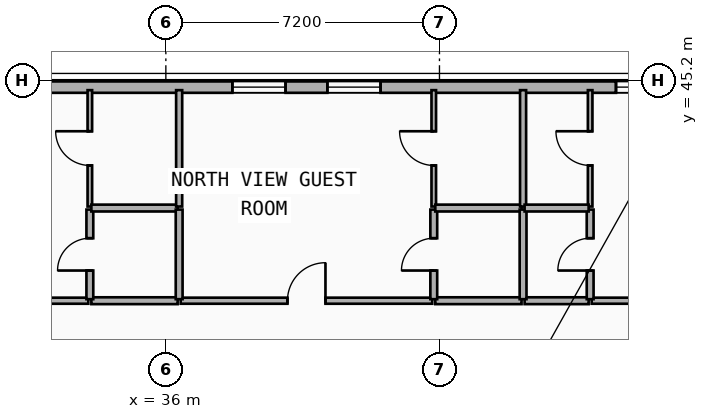
"""IFC4 building model, lengths in metres.
Left out: names, types, materials, properties, quantities, classifications, styles, units other than length and angle.
Written with IfcOpenShell. Run it as: python <this file> out.ifc"""

import sys

from ifc_helpers import new_model, si_unit, direction, frame, frame_2d, origin, place, context, subcontext, project, spatial, rectangle, extrude, element, fill, save


model = new_model("IFC4")
c1 = context("Model", 3, precision=1e-05, world=origin(), true_north=direction((0.0, 1.0)))
c2 = subcontext(c1, "Body", "Model", "MODEL_VIEW")
j1 = project(units=[si_unit("LENGTHUNIT", "METRE"), si_unit("PLANEANGLEUNIT", "RADIAN")], contexts=[c1])
p1 = place(None, origin())
s1 = spatial("IfcSite", under=j1, at=p1, CompositionType="ELEMENT")
p2 = place(p1, origin())
s2 = spatial("IfcBuilding", under=s1, at=p2, CompositionType="ELEMENT")
p3 = place(p2, frame((0.0, 0.0, 46.5)))
s3 = spatial("IfcBuildingStorey", under=s2, at=p3, CompositionType="ELEMENT", Elevation=46.5)
p4 = place(p3, frame((4.2, 45.02, 0.0), z_axis=(0.0, 0.0, 1.0), x_axis=(1.0, 0.0, 0.0)))
e1 = element("IfcWall", 1, at=p4, inside=s3, PredefinedType="SOLIDWALL", context=c2, shape_type="SweptSolid", body=[
    extrude(rectangle(XDim=49.2, YDim=0.3, at=frame_2d((24.6, 0.0))), origin(), (0.0, 0.0, 1.0), 3.24),
])
p5 = place(p4, frame((7.99, 0.0, 0.85)))
e2 = element("IfcOpeningElement", 2, at=p5, cuts=e1, PredefinedType="OPENING", context=c2, shape_type="SweptSolid", body=[
    extrude(rectangle(XDim=1.4, YDim=1.8, at=frame_2d((0.7, 0.9))), frame((0.0, 0.16, 0.0), z_axis=(0.0, -1.0, 0.0), x_axis=(1.0, 0.0, 0.0)), (0.0, 0.0, 1.0), 0.32),
])
p6 = place(p4, frame((11.22, 0.0, 0.85)))
e3 = element("IfcOpeningElement", 3, at=p6, cuts=e1, PredefinedType="OPENING", context=c2, shape_type="SweptSolid", body=[
    extrude(rectangle(XDim=1.4, YDim=1.8, at=frame_2d((0.7, 0.9))), frame((0.0, 0.16, 0.0), z_axis=(0.0, -1.0, 0.0), x_axis=(1.0, 0.0, 0.0)), (0.0, 0.0, 1.0), 0.32),
])
p7 = place(p4, frame((17.78, 0.0, 0.85)))
e4 = element("IfcOpeningElement", 4, at=p7, cuts=e1, PredefinedType="OPENING", context=c2, shape_type="SweptSolid", body=[
    extrude(rectangle(XDim=1.4, YDim=1.8, at=frame_2d((0.7, 0.9))), frame((0.0, 0.16, 0.0), z_axis=(0.0, -1.0, 0.0), x_axis=(1.0, 0.0, 0.0)), (0.0, 0.0, 1.0), 0.32),
])
p8 = place(p4, frame((19.559, 0.0, 0.85)))
e5 = element("IfcOpeningElement", 5, at=p8, cuts=e1, PredefinedType="OPENING", context=c2, shape_type="SweptSolid", body=[
    extrude(rectangle(XDim=1.4, YDim=1.8, at=frame_2d((0.7, 0.9))), frame((0.0, 0.16, 0.0), z_axis=(0.0, -1.0, 0.0), x_axis=(1.0, 0.0, 0.0)), (0.0, 0.0, 1.0), 0.32),
])
p9 = place(p4, frame((24.703, 0.0, 0.85)))
e6 = element("IfcOpeningElement", 6, at=p9, cuts=e1, PredefinedType="OPENING", context=c2, shape_type="SweptSolid", body=[
    extrude(rectangle(XDim=1.4, YDim=1.8, at=frame_2d((0.7, 0.9))), frame((0.0, 0.16, 0.0), z_axis=(0.0, -1.0, 0.0), x_axis=(1.0, 0.0, 0.0)), (0.0, 0.0, 1.0), 0.32),
])
p10 = place(p4, frame((27.101, 0.0, 0.85)))
e7 = element("IfcOpeningElement", 7, at=p10, cuts=e1, PredefinedType="OPENING", context=c2, shape_type="SweptSolid", body=[
    extrude(rectangle(XDim=1.4, YDim=1.8, at=frame_2d((0.7, 0.9))), frame((0.0, 0.16, 0.0), z_axis=(0.0, -1.0, 0.0), x_axis=(1.0, 0.0, 0.0)), (0.0, 0.0, 1.0), 0.32),
])
p11 = place(p4, frame((33.55, 0.0, 0.85)))
e8 = element("IfcOpeningElement", 8, at=p11, cuts=e1, PredefinedType="OPENING", context=c2, shape_type="SweptSolid", body=[
    extrude(rectangle(XDim=1.4, YDim=1.8, at=frame_2d((0.7, 0.9))), frame((0.0, 0.16, 0.0), z_axis=(0.0, -1.0, 0.0), x_axis=(1.0, 0.0, 0.0)), (0.0, 0.0, 1.0), 0.32),
])
p12 = place(p4, frame((36.05, 0.0, 0.85)))
e9 = element("IfcOpeningElement", 9, at=p12, cuts=e1, PredefinedType="OPENING", context=c2, shape_type="SweptSolid", body=[
    extrude(rectangle(XDim=1.4, YDim=1.8, at=frame_2d((0.7, 0.9))), frame((0.0, 0.16, 0.0), z_axis=(0.0, -1.0, 0.0), x_axis=(1.0, 0.0, 0.0)), (0.0, 0.0, 1.0), 0.32),
])
p13 = place(p4, frame((43.645, 0.0, 0.85)))
e10 = element("IfcOpeningElement", 10, at=p13, cuts=e1, PredefinedType="OPENING", context=c2, shape_type="SweptSolid", body=[
    extrude(rectangle(XDim=1.4, YDim=1.8, at=frame_2d((0.7, 0.9))), frame((0.0, 0.16, 0.0), z_axis=(0.0, -1.0, 0.0), x_axis=(1.0, 0.0, 0.0)), (0.0, 0.0, 1.0), 0.32),
])
p14 = place(p4, frame((45.424, 0.0, 0.85)))
e11 = element("IfcOpeningElement", 11, at=p14, cuts=e1, PredefinedType="OPENING", context=c2, shape_type="SweptSolid", body=[
    extrude(rectangle(XDim=1.4, YDim=1.8, at=frame_2d((0.7, 0.9))), frame((0.0, 0.16, 0.0), z_axis=(0.0, -1.0, 0.0), x_axis=(1.0, 0.0, 0.0)), (0.0, 0.0, 1.0), 0.32),
])
p15 = place(p3, frame((27.644, 39.4, 0.0), z_axis=(0.0, 0.0, 1.0), x_axis=(1.0, 0.0, 0.0)))
e12 = element("IfcWall", 12, at=p15, inside=s3, PredefinedType="PARTITIONING", context=c2, shape_type="SweptSolid", body=[
    extrude(rectangle(XDim=6.316, YDim=0.16, at=frame_2d((3.158, 0.0))), origin(), (0.0, 0.0, 1.0), 3.24),
])
p16 = place(p15, frame((2.658, 0.0, 0.0)))
e13 = element("IfcOpeningElement", 13, at=p16, cuts=e12, PredefinedType="OPENING", context=c2, shape_type="SweptSolid", body=[
    extrude(rectangle(XDim=1.0, YDim=2.15, at=frame_2d((0.5, 1.075))), frame((0.0, 0.09, 0.0), z_axis=(0.0, -1.0, 0.0), x_axis=(1.0, 0.0, 0.0)), (0.0, 0.0, 1.0), 0.18),
])
p17 = place(p3, frame((34.04, 39.4, 0.0), z_axis=(0.0, 0.0, 1.0), x_axis=(1.0, 0.0, 0.0)))
e14 = element("IfcWall", 14, at=p17, inside=s3, PredefinedType="PLUMBINGWALL", context=c2, shape_type="SweptSolid", body=[
    extrude(rectangle(XDim=2.27, YDim=0.18, at=frame_2d((1.135, 0.0))), origin(), (0.0, 0.0, 1.0), 3.24),
])
p18 = place(p3, frame((36.39, 39.4, 0.0), z_axis=(0.0, 0.0, 1.0), x_axis=(1.0, 0.0, 0.0)))
e15 = element("IfcWall", 15, at=p18, inside=s3, PredefinedType="PARTITIONING", context=c2, shape_type="SweptSolid", body=[
    extrude(rectangle(XDim=6.62, YDim=0.16, at=frame_2d((3.31, 0.0))), origin(), (0.0, 0.0, 1.0), 3.24),
])
p19 = place(p18, frame((2.81, 0.0, 0.0)))
e16 = element("IfcOpeningElement", 16, at=p19, cuts=e15, PredefinedType="OPENING", context=c2, shape_type="SweptSolid", body=[
    extrude(rectangle(XDim=1.0, YDim=2.15, at=frame_2d((0.5, 1.075))), frame((0.0, 0.09, 0.0), z_axis=(0.0, -1.0, 0.0), x_axis=(1.0, 0.0, 0.0)), (0.0, 0.0, 1.0), 0.18),
])
p20 = place(p3, frame((43.09, 39.4, 0.0), z_axis=(0.0, 0.0, 1.0), x_axis=(1.0, 0.0, 0.0)))
e17 = element("IfcWall", 17, at=p20, inside=s3, PredefinedType="PLUMBINGWALL", context=c2, shape_type="SweptSolid", body=[
    extrude(rectangle(XDim=2.27, YDim=0.18, at=frame_2d((1.135, 0.0))), origin(), (0.0, 0.0, 1.0), 3.24),
])
p21 = place(p3, frame((47.205, 39.4, 0.0), z_axis=(0.0, 0.0, 1.0), x_axis=(1.0, 0.0, 0.0)))
e18 = element("IfcWall", 18, at=p21, inside=s3, PredefinedType="PARTITIONING", context=c2, shape_type="SweptSolid", body=[
    extrude(rectangle(XDim=4.459, YDim=0.16, at=frame_2d((2.229, 0.0))), origin(), (0.0, 0.0, 1.0), 3.24),
])
p22 = place(p21, frame((1.729, 0.0, 0.0)))
e19 = element("IfcOpeningElement", 19, at=p22, cuts=e18, PredefinedType="OPENING", context=c2, shape_type="SweptSolid", body=[
    extrude(rectangle(XDim=1.0, YDim=2.15, at=frame_2d((0.5, 1.075))), frame((0.0, 0.09, 0.0), z_axis=(0.0, -1.0, 0.0), x_axis=(1.0, 0.0, 0.0)), (0.0, 0.0, 1.0), 0.18),
])
p23 = place(p3, frame((45.44, 39.4, 0.0), z_axis=(0.0, 0.0, 1.0), x_axis=(1.0, 0.0, 0.0)))
e20 = element("IfcWall", 20, at=p23, inside=s3, PredefinedType="PLUMBINGWALL", context=c2, shape_type="SweptSolid", body=[
    extrude(rectangle(XDim=1.685, YDim=0.18, at=frame_2d((0.843, 0.0))), origin(), (0.0, 0.0, 1.0), 3.24),
])
p24 = place(p3, frame((34.0, 39.44, 0.0), z_axis=(0.0, 0.0, 1.0), x_axis=(0.0, 1.0, 0.0)))
e21 = element("IfcWall", 21, at=p24, inside=s3, PredefinedType="PLUMBINGWALL", context=c2, shape_type="SweptSolid", body=[
    extrude(rectangle(XDim=2.358, YDim=0.18, at=frame_2d((1.179, 0.0))), origin(), (0.0, 0.0, 1.0), 3.24),
])
p25 = place(p24, frame((0.754, 0.0, 0.0)))
e22 = element("IfcOpeningElement", 22, at=p25, cuts=e21, PredefinedType="OPENING", context=c2, shape_type="SweptSolid", body=[
    extrude(rectangle(XDim=0.85, YDim=2.1, at=frame_2d((0.425, 1.05))), frame((0.0, 0.1, 0.0), z_axis=(0.0, -1.0, 0.0), x_axis=(1.0, 0.0, 0.0)), (0.0, 0.0, 1.0), 0.2),
])
p26 = place(p3, frame((34.0, 41.878, 0.0), z_axis=(0.0, 0.0, 1.0), x_axis=(0.0, 1.0, 0.0)))
e23 = element("IfcWall", 23, at=p26, inside=s3, PredefinedType="PARTITIONING", context=c2, shape_type="SweptSolid", body=[
    extrude(rectangle(XDim=3.062, YDim=0.12, at=frame_2d((1.531, 0.0))), origin(), (0.0, 0.0, 1.0), 3.24),
])
p27 = place(p26, frame((1.081, 0.0, 0.0)))
e24 = element("IfcOpeningElement", 24, at=p27, cuts=e23, PredefinedType="OPENING", context=c2, shape_type="SweptSolid", body=[
    extrude(rectangle(XDim=0.9, YDim=2.1, at=frame_2d((0.45, 1.05))), frame((0.0, 0.07, 0.0), z_axis=(0.0, -1.0, 0.0), x_axis=(1.0, 0.0, 0.0)), (0.0, 0.0, 1.0), 0.14),
])
p28 = place(p3, frame((34.04, 41.838, 0.0), z_axis=(0.0, 0.0, 1.0), x_axis=(1.0, 0.0, 0.0)))
e25 = element("IfcWall", 25, at=p28, inside=s3, PredefinedType="PLUMBINGWALL", context=c2, shape_type="SweptSolid", body=[
    extrude(rectangle(XDim=2.27, YDim=0.18, at=frame_2d((1.135, 0.0))), origin(), (0.0, 0.0, 1.0), 3.24),
])
p29 = place(p3, frame((36.35, 39.44, 0.0), z_axis=(0.0, 0.0, 1.0), x_axis=(0.0, 1.0, 0.0)))
e26 = element("IfcWall", 26, at=p29, inside=s3, PredefinedType="PLUMBINGWALL", context=c2, shape_type="SweptSolid", body=[
    extrude(rectangle(XDim=2.358, YDim=0.18, at=frame_2d((1.179, 0.0))), origin(), (0.0, 0.0, 1.0), 3.24),
])
p30 = place(p3, frame((36.35, 41.878, 0.0), z_axis=(0.0, 0.0, 1.0), x_axis=(0.0, 1.0, 0.0)))
e27 = element("IfcWall", 27, at=p30, inside=s3, PredefinedType="PARTITIONING", context=c2, shape_type="SweptSolid", body=[
    extrude(rectangle(XDim=3.062, YDim=0.16, at=frame_2d((1.531, 0.0))), origin(), (0.0, 0.0, 1.0), 3.24),
])
p31 = place(p3, frame((43.05, 39.44, 0.0), z_axis=(0.0, 0.0, 1.0), x_axis=(0.0, 1.0, 0.0)))
e28 = element("IfcWall", 28, at=p31, inside=s3, PredefinedType="PLUMBINGWALL", context=c2, shape_type="SweptSolid", body=[
    extrude(rectangle(XDim=2.358, YDim=0.18, at=frame_2d((1.179, 0.0))), origin(), (0.0, 0.0, 1.0), 3.24),
])
p32 = place(p31, frame((0.754, 0.0, 0.0)))
e29 = element("IfcOpeningElement", 29, at=p32, cuts=e28, PredefinedType="OPENING", context=c2, shape_type="SweptSolid", body=[
    extrude(rectangle(XDim=0.85, YDim=2.1, at=frame_2d((0.425, 1.05))), frame((0.0, 0.1, 0.0), z_axis=(0.0, -1.0, 0.0), x_axis=(1.0, 0.0, 0.0)), (0.0, 0.0, 1.0), 0.2),
])
p33 = place(p3, frame((43.05, 41.878, 0.0), z_axis=(0.0, 0.0, 1.0), x_axis=(0.0, 1.0, 0.0)))
e30 = element("IfcWall", 30, at=p33, inside=s3, PredefinedType="PARTITIONING", context=c2, shape_type="SweptSolid", body=[
    extrude(rectangle(XDim=3.062, YDim=0.12, at=frame_2d((1.531, 0.0))), origin(), (0.0, 0.0, 1.0), 3.24),
])
p34 = place(p33, frame((1.081, 0.0, 0.0)))
e31 = element("IfcOpeningElement", 31, at=p34, cuts=e30, PredefinedType="OPENING", context=c2, shape_type="SweptSolid", body=[
    extrude(rectangle(XDim=0.9, YDim=2.1, at=frame_2d((0.45, 1.05))), frame((0.0, 0.07, 0.0), z_axis=(0.0, -1.0, 0.0), x_axis=(1.0, 0.0, 0.0)), (0.0, 0.0, 1.0), 0.14),
])
p35 = place(p3, frame((43.09, 41.838, 0.0), z_axis=(0.0, 0.0, 1.0), x_axis=(1.0, 0.0, 0.0)))
e32 = element("IfcWall", 32, at=p35, inside=s3, PredefinedType="PLUMBINGWALL", context=c2, shape_type="SweptSolid", body=[
    extrude(rectangle(XDim=2.27, YDim=0.18, at=frame_2d((1.135, 0.0))), origin(), (0.0, 0.0, 1.0), 3.24),
])
p36 = place(p3, frame((45.4, 39.44, 0.0), z_axis=(0.0, 0.0, 1.0), x_axis=(0.0, 1.0, 0.0)))
e33 = element("IfcWall", 33, at=p36, inside=s3, PredefinedType="PLUMBINGWALL", context=c2, shape_type="SweptSolid", body=[
    extrude(rectangle(XDim=2.358, YDim=0.18, at=frame_2d((1.179, 0.0))), origin(), (0.0, 0.0, 1.0), 3.24),
])
p37 = place(p3, frame((45.4, 41.878, 0.0), z_axis=(0.0, 0.0, 1.0), x_axis=(0.0, 1.0, 0.0)))
e34 = element("IfcWall", 34, at=p37, inside=s3, PredefinedType="PARTITIONING", context=c2, shape_type="SweptSolid", body=[
    extrude(rectangle(XDim=3.062, YDim=0.16, at=frame_2d((1.531, 0.0))), origin(), (0.0, 0.0, 1.0), 3.24),
])
p38 = place(p3, frame((47.165, 39.44, 0.0), z_axis=(0.0, 0.0, 1.0), x_axis=(0.0, 1.0, 0.0)))
e35 = element("IfcWall", 35, at=p38, inside=s3, PredefinedType="PLUMBINGWALL", context=c2, shape_type="SweptSolid", body=[
    extrude(rectangle(XDim=2.358, YDim=0.18, at=frame_2d((1.179, 0.0))), origin(), (0.0, 0.0, 1.0), 3.24),
])
p39 = place(p38, frame((0.754, 0.0, 0.0)))
e36 = element("IfcOpeningElement", 36, at=p39, cuts=e35, PredefinedType="OPENING", context=c2, shape_type="SweptSolid", body=[
    extrude(rectangle(XDim=0.85, YDim=2.1, at=frame_2d((0.425, 1.05))), frame((0.0, 0.1, 0.0), z_axis=(0.0, -1.0, 0.0), x_axis=(1.0, 0.0, 0.0)), (0.0, 0.0, 1.0), 0.2),
])
p40 = place(p3, frame((47.165, 41.878, 0.0), z_axis=(0.0, 0.0, 1.0), x_axis=(0.0, 1.0, 0.0)))
e37 = element("IfcWall", 37, at=p40, inside=s3, PredefinedType="PARTITIONING", context=c2, shape_type="SweptSolid", body=[
    extrude(rectangle(XDim=3.062, YDim=0.12, at=frame_2d((1.531, 0.0))), origin(), (0.0, 0.0, 1.0), 3.24),
])
p41 = place(p40, frame((1.081, 0.0, 0.0)))
e38 = element("IfcOpeningElement", 38, at=p41, cuts=e37, PredefinedType="OPENING", context=c2, shape_type="SweptSolid", body=[
    extrude(rectangle(XDim=0.9, YDim=2.1, at=frame_2d((0.45, 1.05))), frame((0.0, 0.07, 0.0), z_axis=(0.0, -1.0, 0.0), x_axis=(1.0, 0.0, 0.0)), (0.0, 0.0, 1.0), 0.14),
])
p42 = place(p3, frame((45.44, 41.838, 0.0), z_axis=(0.0, 0.0, 1.0), x_axis=(1.0, 0.0, 0.0)))
e39 = element("IfcWall", 39, at=p42, inside=s3, PredefinedType="PLUMBINGWALL", context=c2, shape_type="SweptSolid", body=[
    extrude(rectangle(XDim=1.685, YDim=0.18, at=frame_2d((0.843, 0.0))), origin(), (0.0, 0.0, 1.0), 3.24),
])
p43 = place(p11, origin())
e40 = element("IfcWindow", 40, at=p43, inside=s3, PartitioningType="SINGLE_PANEL", PredefinedType="WINDOW", context=c2, shape_type="SweptSolid", body=[
    extrude(rectangle(XDim=1.4, YDim=1.8, at=frame_2d((0.7, 0.9))), frame((0.0, 0.03, 0.0), z_axis=(0.0, -1.0, 0.0), x_axis=(1.0, 0.0, 0.0)), (0.0, 0.0, 1.0), 0.06),
])
fill(e8, e40)
p44 = place(p12, origin())
e41 = element("IfcWindow", 41, at=p44, inside=s3, PartitioningType="SINGLE_PANEL", PredefinedType="WINDOW", context=c2, shape_type="SweptSolid", body=[
    extrude(rectangle(XDim=1.4, YDim=1.8, at=frame_2d((0.7, 0.9))), frame((0.0, 0.03, 0.0), z_axis=(0.0, -1.0, 0.0), x_axis=(1.0, 0.0, 0.0)), (0.0, 0.0, 1.0), 0.06),
])
fill(e9, e41)
p45 = place(p13, origin())
e42 = element("IfcWindow", 42, at=p45, inside=s3, PartitioningType="SINGLE_PANEL", PredefinedType="WINDOW", context=c2, shape_type="SweptSolid", body=[
    extrude(rectangle(XDim=1.4, YDim=1.8, at=frame_2d((0.7, 0.9))), frame((0.0, 0.03, 0.0), z_axis=(0.0, -1.0, 0.0), x_axis=(1.0, 0.0, 0.0)), (0.0, 0.0, 1.0), 0.06),
])
fill(e10, e42)
p46 = place(p19, origin())
e43 = element("IfcDoor", 43, at=p46, inside=s3, OperationType="SINGLE_SWING_RIGHT", PredefinedType="DOOR", context=c2, shape_type="SweptSolid", body=[
    extrude(rectangle(XDim=1.0, YDim=2.15, at=frame_2d((0.5, 1.075))), frame((0.0, 0.025, 0.0), z_axis=(0.0, -1.0, 0.0), x_axis=(1.0, 0.0, 0.0)), (0.0, 0.0, 1.0), 0.05),
])
fill(e16, e43)
p47 = place(p25, origin())
e44 = element("IfcDoor", 44, at=p47, inside=s3, OperationType="SINGLE_SWING_LEFT", PredefinedType="DOOR", context=c2, shape_type="SweptSolid", body=[
    extrude(rectangle(XDim=0.85, YDim=2.1, at=frame_2d((0.425, 1.05))), frame((0.0, 0.025, 0.0), z_axis=(0.0, -1.0, 0.0), x_axis=(1.0, 0.0, 0.0)), (0.0, 0.0, 1.0), 0.05),
])
fill(e22, e44)
p48 = place(p27, origin())
e45 = element("IfcDoor", 45, at=p48, inside=s3, OperationType="SINGLE_SWING_RIGHT", PredefinedType="DOOR", context=c2, shape_type="SweptSolid", body=[
    extrude(rectangle(XDim=0.9, YDim=2.1, at=frame_2d((0.45, 1.05))), frame((0.0, 0.025, 0.0), z_axis=(0.0, -1.0, 0.0), x_axis=(1.0, 0.0, 0.0)), (0.0, 0.0, 1.0), 0.05),
])
fill(e24, e45)
p49 = place(p32, origin())
e46 = element("IfcDoor", 46, at=p49, inside=s3, OperationType="SINGLE_SWING_LEFT", PredefinedType="DOOR", context=c2, shape_type="SweptSolid", body=[
    extrude(rectangle(XDim=0.85, YDim=2.1, at=frame_2d((0.425, 1.05))), frame((0.0, 0.025, 0.0), z_axis=(0.0, -1.0, 0.0), x_axis=(1.0, 0.0, 0.0)), (0.0, 0.0, 1.0), 0.05),
])
fill(e29, e46)
p50 = place(p34, origin())
e47 = element("IfcDoor", 47, at=p50, inside=s3, OperationType="SINGLE_SWING_RIGHT", PredefinedType="DOOR", context=c2, shape_type="SweptSolid", body=[
    extrude(rectangle(XDim=0.9, YDim=2.1, at=frame_2d((0.45, 1.05))), frame((0.0, 0.025, 0.0), z_axis=(0.0, -1.0, 0.0), x_axis=(1.0, 0.0, 0.0)), (0.0, 0.0, 1.0), 0.05),
])
fill(e31, e47)
p51 = place(p39, origin())
e48 = element("IfcDoor", 48, at=p51, inside=s3, OperationType="SINGLE_SWING_LEFT", PredefinedType="DOOR", context=c2, shape_type="SweptSolid", body=[
    extrude(rectangle(XDim=0.85, YDim=2.1, at=frame_2d((0.425, 1.05))), frame((0.0, 0.025, 0.0), z_axis=(0.0, -1.0, 0.0), x_axis=(1.0, 0.0, 0.0)), (0.0, 0.0, 1.0), 0.05),
])
fill(e36, e48)
p52 = place(p41, origin())
e49 = element("IfcDoor", 49, at=p52, inside=s3, OperationType="SINGLE_SWING_RIGHT", PredefinedType="DOOR", context=c2, shape_type="SweptSolid", body=[
    extrude(rectangle(XDim=0.9, YDim=2.1, at=frame_2d((0.45, 1.05))), frame((0.0, 0.025, 0.0), z_axis=(0.0, -1.0, 0.0), x_axis=(1.0, 0.0, 0.0)), (0.0, 0.0, 1.0), 0.05),
])
fill(e38, e49)
save(model, sys.argv[1])
